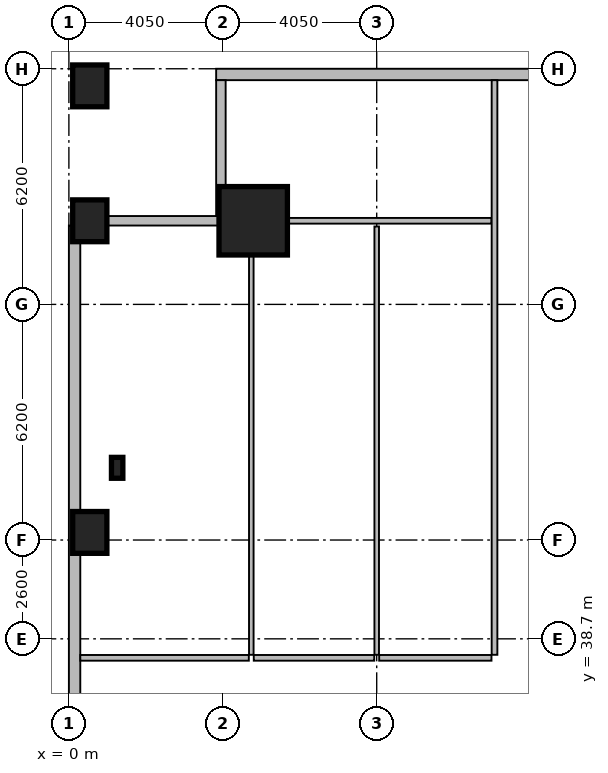
"""IFC4 building model, lengths in metres.
Left out: names, types, materials, properties, quantities, classifications, styles, units other than length and angle.
Written with IfcOpenShell. Run it as: python <this file> out.ifc"""

import sys

from ifc_helpers import new_model, si_unit, direction, frame, frame_2d, origin, origin_2d, place, context, subcontext, project, spatial, rectangle, hollow_rectangle, i_section, extrude, element, fill, save


model = new_model("IFC4")
c1 = context("Model", 3, precision=1e-05, world=origin(), true_north=direction((0.0, 1.0)))
c2 = subcontext(c1, "Body", "Model", "MODEL_VIEW")
j1 = project(units=[si_unit("LENGTHUNIT", "METRE"), si_unit("PLANEANGLEUNIT", "RADIAN")], contexts=[c1])
p1 = place(None, origin())
s1 = spatial("IfcSite", under=j1, at=p1, CompositionType="ELEMENT")
p2 = place(p1, origin())
s2 = spatial("IfcBuilding", under=s1, at=p2, CompositionType="ELEMENT")
p3 = place(p2, origin())
s3 = spatial("IfcBuildingStorey", under=s2, at=p3, CompositionType="ELEMENT", Elevation=0.0)
p4 = place(p3, frame((4.85, 49.7, 0.0), z_axis=(0.0, 0.0, 1.0), x_axis=(1.0, 0.0, 0.0)))
e1 = element("IfcColumn", 1, at=p4, inside=s3, PredefinedType="COLUMN", context=c2, shape_type="SweptSolid", body=[
    extrude(hollow_rectangle(XDim=1.8, YDim=1.8, WallThickness=0.08, at=origin_2d()), origin(), (0.0, 0.0, 1.0), 5.4),
])
p5 = place(p3, frame((1.27, 43.2, 0.0), z_axis=(0.0, 0.0, 1.0), x_axis=(1.0, 0.0, 0.0)))
e2 = element("IfcColumn", 2, at=p5, inside=s3, PredefinedType="COLUMN", context=c2, shape_type="SweptSolid", body=[
    extrude(i_section(OverallWidth=0.3, OverallDepth=0.55, WebThickness=0.015, FlangeThickness=0.029, at=origin_2d()), origin(), (0.0, 0.0, 1.0), 5.4),
])
for number, where, z_axis, x_axis in (
    (3, (0.55, 49.7, 0.0), (0.0, 0.0, 1.0), (1.0, 0.0, 0.0)),
    (4, (0.55, 53.25, 0.0), (0.0, 0.0, 1.0), (1.0, 0.0, 0.0)),
    (5, (0.55, 41.5, 0.0), (0.0, 0.0, 1.0), (1.0, 0.0, 0.0)),
):
    element("IfcColumn", number, at=place(p3, frame(where, z_axis=z_axis, x_axis=x_axis)), inside=s3, PredefinedType="PILASTER", context=c2, shape_type="SweptSolid", body=[
        extrude(rectangle(XDim=0.9, YDim=1.1, at=origin_2d()), origin(), (0.0, 0.0, 1.0), 5.4),
    ])
p6 = place(p3, frame((0.15, 49.575, 0.0), z_axis=(0.0, 0.0, 1.0), x_axis=(0.0, -1.0, 0.0)))
e6 = element("IfcWall", 6, at=p6, inside=s3, PredefinedType="SOLIDWALL", context=c2, shape_type="SweptSolid", body=[
    extrude(rectangle(XDim=49.275, YDim=0.3, at=frame_2d((24.637, 0.0))), origin(), (0.0, 0.0, 1.0), 4.54),
])
p7 = place(p6, frame((3.075, 0.0, 0.9)))
e7 = element("IfcOpeningElement", 7, at=p7, cuts=e6, PredefinedType="OPENING", context=c2, shape_type="SweptSolid", body=[
    extrude(rectangle(XDim=1.8, YDim=3.2, at=frame_2d((0.9, 1.6))), frame((0.0, 0.16, 0.0), z_axis=(0.0, -1.0, 0.0), x_axis=(1.0, 0.0, 0.0)), (0.0, 0.0, 1.0), 0.32),
])
p8 = place(p6, frame((12.525, 0.0, 0.9)))
e8 = element("IfcOpeningElement", 8, at=p8, cuts=e6, PredefinedType="OPENING", context=c2, shape_type="SweptSolid", body=[
    extrude(rectangle(XDim=1.5, YDim=2.4, at=frame_2d((0.75, 1.2))), frame((0.0, 0.16, 0.0), z_axis=(0.0, -1.0, 0.0), x_axis=(1.0, 0.0, 0.0)), (0.0, 0.0, 1.0), 0.32),
])
p9 = place(p6, frame((21.725, 0.0, 0.9)))
e9 = element("IfcOpeningElement", 9, at=p9, cuts=e6, PredefinedType="OPENING", context=c2, shape_type="SweptSolid", body=[
    extrude(rectangle(XDim=1.8, YDim=3.2, at=frame_2d((0.9, 1.6))), frame((0.0, 0.16, 0.0), z_axis=(0.0, -1.0, 0.0), x_axis=(1.0, 0.0, 0.0)), (0.0, 0.0, 1.0), 0.32),
])
p10 = place(p6, frame((30.175, 0.0, 0.9)))
e10 = element("IfcOpeningElement", 10, at=p10, cuts=e6, PredefinedType="OPENING", context=c2, shape_type="SweptSolid", body=[
    extrude(rectangle(XDim=1.5, YDim=2.4, at=frame_2d((0.75, 1.2))), frame((0.0, 0.16, 0.0), z_axis=(0.0, -1.0, 0.0), x_axis=(1.0, 0.0, 0.0)), (0.0, 0.0, 1.0), 0.32),
])
p11 = place(p6, frame((36.375, 0.0, 0.9)))
e11 = element("IfcOpeningElement", 11, at=p11, cuts=e6, PredefinedType="OPENING", context=c2, shape_type="SweptSolid", body=[
    extrude(rectangle(XDim=1.8, YDim=3.2, at=frame_2d((0.9, 1.6))), frame((0.0, 0.16, 0.0), z_axis=(0.0, -1.0, 0.0), x_axis=(1.0, 0.0, 0.0)), (0.0, 0.0, 1.0), 0.32),
])
p12 = place(p3, frame((3.875, 53.55, 0.0), z_axis=(0.0, 0.0, 1.0), x_axis=(1.0, 0.0, 0.0)))
e12 = element("IfcWall", 12, at=p12, inside=s3, PredefinedType="SOLIDWALL", context=c2, shape_type="SweptSolid", body=[
    extrude(rectangle(XDim=12.325, YDim=0.3, at=frame_2d((6.163, 0.0))), origin(), (0.0, 0.0, 1.0), 4.54),
])
p13 = place(p12, frame((8.675, 0.0, 0.0)))
e13 = element("IfcOpeningElement", 13, at=p13, cuts=e12, PredefinedType="OPENING", context=c2, shape_type="SweptSolid", body=[
    extrude(rectangle(XDim=1.8, YDim=2.4, at=frame_2d((0.9, 1.2))), frame((0.0, 0.16, 0.0), z_axis=(0.0, -1.0, 0.0), x_axis=(1.0, 0.0, 0.0)), (0.0, 0.0, 1.0), 0.32),
])
p14 = place(p12, frame((2.475, 0.0, 1.0)))
e14 = element("IfcOpeningElement", 14, at=p14, cuts=e12, PredefinedType="OPENING", context=c2, shape_type="SweptSolid", body=[
    extrude(rectangle(XDim=1.2, YDim=2.8, at=frame_2d((0.6, 1.4))), frame((0.0, 0.16, 0.0), z_axis=(0.0, -1.0, 0.0), x_axis=(1.0, 0.0, 0.0)), (0.0, 0.0, 1.0), 0.32),
])
p15 = place(p3, frame((0.3, 49.7, 0.0), z_axis=(0.0, 0.0, 1.0), x_axis=(1.0, 0.0, 0.0)))
e15 = element("IfcWall", 15, at=p15, inside=s3, PredefinedType="SOLIDWALL", context=c2, shape_type="SweptSolid", body=[
    extrude(rectangle(XDim=3.825, YDim=0.25, at=frame_2d((1.913, 0.0))), origin(), (0.0, 0.0, 1.0), 4.54),
])
p16 = place(p15, frame((1.312, 0.0, 0.9)))
e16 = element("IfcOpeningElement", 16, at=p16, cuts=e15, PredefinedType="OPENING", context=c2, shape_type="SweptSolid", body=[
    extrude(rectangle(XDim=1.2, YDim=2.8, at=frame_2d((0.6, 1.4))), frame((0.0, 0.135, 0.0), z_axis=(0.0, -1.0, 0.0), x_axis=(1.0, 0.0, 0.0)), (0.0, 0.0, 1.0), 0.27),
])
p17 = place(p3, frame((4.0, 49.825, 0.0), z_axis=(0.0, 0.0, 1.0), x_axis=(0.0, 1.0, 0.0)))
e17 = element("IfcWall", 17, at=p17, inside=s3, PredefinedType="SOLIDWALL", context=c2, shape_type="SweptSolid", body=[
    extrude(rectangle(XDim=3.575, YDim=0.25, at=frame_2d((1.788, 0.0))), origin(), (0.0, 0.0, 1.0), 4.54),
])
p18 = place(p3, frame((4.125, 49.7, 0.0), z_axis=(0.0, 0.0, 1.0), x_axis=(1.0, 0.0, 0.0)))
e18 = element("IfcWall", 18, at=p18, inside=s3, PredefinedType="PARTITIONING", context=c2, shape_type="SweptSolid", body=[
    extrude(rectangle(XDim=6.995, YDim=0.15, at=frame_2d((3.498, 0.0))), origin(), (0.0, 0.0, 1.0), 5.2),
])
p19 = place(p3, frame((11.2, 38.28, 0.0), z_axis=(0.0, 0.0, 1.0), x_axis=(0.0, 1.0, 0.0)))
e19 = element("IfcWall", 19, at=p19, inside=s3, PredefinedType="PARTITIONING", context=c2, shape_type="SweptSolid", body=[
    extrude(rectangle(XDim=15.12, YDim=0.15, at=frame_2d((7.56, 0.0))), origin(), (0.0, 0.0, 1.0), 4.29),
])
p20 = place(p19, frame((12.1, 0.0, 0.0)))
e20 = element("IfcOpeningElement", 20, at=p20, cuts=e19, PredefinedType="OPENING", context=c2, shape_type="SweptSolid", body=[
    extrude(rectangle(XDim=0.9, YDim=2.05, at=frame_2d((0.45, 1.025))), frame((0.0, 0.085, 0.0), z_axis=(0.0, -1.0, 0.0), x_axis=(1.0, 0.0, 0.0)), (0.0, 0.0, 1.0), 0.17),
])
p21 = place(p3, frame((0.3, 38.2, 0.0), z_axis=(0.0, 0.0, 1.0), x_axis=(1.0, 0.0, 0.0)))
e21 = element("IfcWall", 21, at=p21, inside=s3, PredefinedType="PARTITIONING", context=c2, shape_type="SweptSolid", body=[
    extrude(rectangle(XDim=4.435, YDim=0.15, at=frame_2d((2.218, 0.0))), origin(), (0.0, 0.0, 1.0), 4.54),
])
p22 = place(p21, frame((1.6, 0.0, 0.0)))
e22 = element("IfcOpeningElement", 22, at=p22, cuts=e21, PredefinedType="OPENING", context=c2, shape_type="SweptSolid", body=[
    extrude(rectangle(XDim=0.95, YDim=2.05, at=frame_2d((0.475, 1.025))), frame((0.0, 0.085, 0.0), z_axis=(0.0, -1.0, 0.0), x_axis=(1.0, 0.0, 0.0)), (0.0, 0.0, 1.0), 0.17),
])
p23 = place(p3, frame((4.865, 38.2, 0.0), z_axis=(0.0, 0.0, 1.0), x_axis=(1.0, 0.0, 0.0)))
e23 = element("IfcWall", 23, at=p23, inside=s3, PredefinedType="PARTITIONING", context=c2, shape_type="SweptSolid", body=[
    extrude(rectangle(XDim=3.17, YDim=0.15, at=frame_2d((1.585, 0.0))), origin(), (0.0, 0.0, 1.0), 5.2),
])
p24 = place(p23, frame((1.05, 0.0, 0.0)))
e24 = element("IfcOpeningElement", 24, at=p24, cuts=e23, PredefinedType="OPENING", context=c2, shape_type="SweptSolid", body=[
    extrude(rectangle(XDim=0.95, YDim=2.05, at=frame_2d((0.475, 1.025))), frame((0.0, 0.085, 0.0), z_axis=(0.0, -1.0, 0.0), x_axis=(1.0, 0.0, 0.0)), (0.0, 0.0, 1.0), 0.17),
])
p25 = place(p3, frame((8.165, 38.2, 0.0), z_axis=(0.0, 0.0, 1.0), x_axis=(1.0, 0.0, 0.0)))
e25 = element("IfcWall", 25, at=p25, inside=s3, PredefinedType="PARTITIONING", context=c2, shape_type="SweptSolid", body=[
    extrude(rectangle(XDim=2.955, YDim=0.15, at=frame_2d((1.478, 0.0))), origin(), (0.0, 0.0, 1.0), 5.2),
])
p26 = place(p25, frame((0.95, 0.0, 0.0)))
e26 = element("IfcOpeningElement", 26, at=p26, cuts=e25, PredefinedType="OPENING", context=c2, shape_type="SweptSolid", body=[
    extrude(rectangle(XDim=0.95, YDim=2.05, at=frame_2d((0.475, 1.025))), frame((0.0, 0.085, 0.0), z_axis=(0.0, -1.0, 0.0), x_axis=(1.0, 0.0, 0.0)), (0.0, 0.0, 1.0), 0.17),
])
for number, where, z_axis, x_axis in (
    (27, (4.8, 38.28, 0.0), (0.0, 0.0, 1.0), (0.0, 1.0, 0.0)),
    (28, (8.1, 38.28, 0.0), (0.0, 0.0, 1.0), (0.0, 1.0, 0.0)),
):
    element("IfcWall", number, at=place(p3, frame(where, z_axis=z_axis, x_axis=x_axis)), inside=s3, PredefinedType="PARTITIONING", context=c2, shape_type="SweptSolid", body=[
        extrude(rectangle(XDim=11.27, YDim=0.12, at=frame_2d((5.635, 0.0))), origin(), (0.0, 0.0, 1.0), 4.29),
    ])
p27 = place(p7, origin())
e29 = element("IfcWindow", 29, at=p27, inside=s3, PartitioningType="SINGLE_PANEL", PredefinedType="WINDOW", context=c2, shape_type="SweptSolid", body=[
    extrude(rectangle(XDim=1.8, YDim=3.2, at=frame_2d((0.9, 1.6))), frame((0.0, 0.03, 0.0), z_axis=(0.0, -1.0, 0.0), x_axis=(1.0, 0.0, 0.0)), (0.0, 0.0, 1.0), 0.06),
])
fill(e7, e29)
p28 = place(p14, origin())
e30 = element("IfcWindow", 30, at=p28, inside=s3, PartitioningType="SINGLE_PANEL", PredefinedType="WINDOW", context=c2, shape_type="SweptSolid", body=[
    extrude(rectangle(XDim=1.2, YDim=2.8, at=frame_2d((0.6, 1.4))), frame((0.0, 0.03, 0.0), z_axis=(0.0, -1.0, 0.0), x_axis=(1.0, 0.0, 0.0)), (0.0, 0.0, 1.0), 0.06),
])
fill(e14, e30)
p29 = place(p16, origin())
e31 = element("IfcWindow", 31, at=p29, inside=s3, PartitioningType="SINGLE_PANEL", PredefinedType="WINDOW", context=c2, shape_type="SweptSolid", body=[
    extrude(rectangle(XDim=1.2, YDim=2.8, at=frame_2d((0.6, 1.4))), frame((0.0, 0.03, 0.0), z_axis=(0.0, -1.0, 0.0), x_axis=(1.0, 0.0, 0.0)), (0.0, 0.0, 1.0), 0.06),
])
fill(e16, e31)
p30 = place(p20, origin())
e32 = element("IfcDoor", 32, at=p30, inside=s3, OperationType="SINGLE_SWING_RIGHT", PredefinedType="DOOR", context=c2, shape_type="SweptSolid", body=[
    extrude(rectangle(XDim=0.9, YDim=2.05, at=frame_2d((0.45, 1.025))), frame((0.0, 0.025, 0.0), z_axis=(0.0, -1.0, 0.0), x_axis=(1.0, 0.0, 0.0)), (0.0, 0.0, 1.0), 0.05),
])
fill(e20, e32)
p31 = place(p22, origin())
e33 = element("IfcDoor", 33, at=p31, inside=s3, OperationType="SINGLE_SWING_LEFT", PredefinedType="DOOR", context=c2, shape_type="SweptSolid", body=[
    extrude(rectangle(XDim=0.95, YDim=2.05, at=frame_2d((0.475, 1.025))), frame((0.0, 0.025, 0.0), z_axis=(0.0, -1.0, 0.0), x_axis=(1.0, 0.0, 0.0)), (0.0, 0.0, 1.0), 0.05),
])
fill(e22, e33)
p32 = place(p24, origin())
e34 = element("IfcDoor", 34, at=p32, inside=s3, OperationType="SINGLE_SWING_RIGHT", PredefinedType="DOOR", context=c2, shape_type="SweptSolid", body=[
    extrude(rectangle(XDim=0.95, YDim=2.05, at=frame_2d((0.475, 1.025))), frame((0.0, 0.025, 0.0), z_axis=(0.0, -1.0, 0.0), x_axis=(1.0, 0.0, 0.0)), (0.0, 0.0, 1.0), 0.05),
])
fill(e24, e34)
p33 = place(p26, origin())
e35 = element("IfcDoor", 35, at=p33, inside=s3, OperationType="SINGLE_SWING_LEFT", PredefinedType="DOOR", context=c2, shape_type="SweptSolid", body=[
    extrude(rectangle(XDim=0.95, YDim=2.05, at=frame_2d((0.475, 1.025))), frame((0.0, 0.025, 0.0), z_axis=(0.0, -1.0, 0.0), x_axis=(1.0, 0.0, 0.0)), (0.0, 0.0, 1.0), 0.05),
])
fill(e26, e35)
save(model, sys.argv[1])
